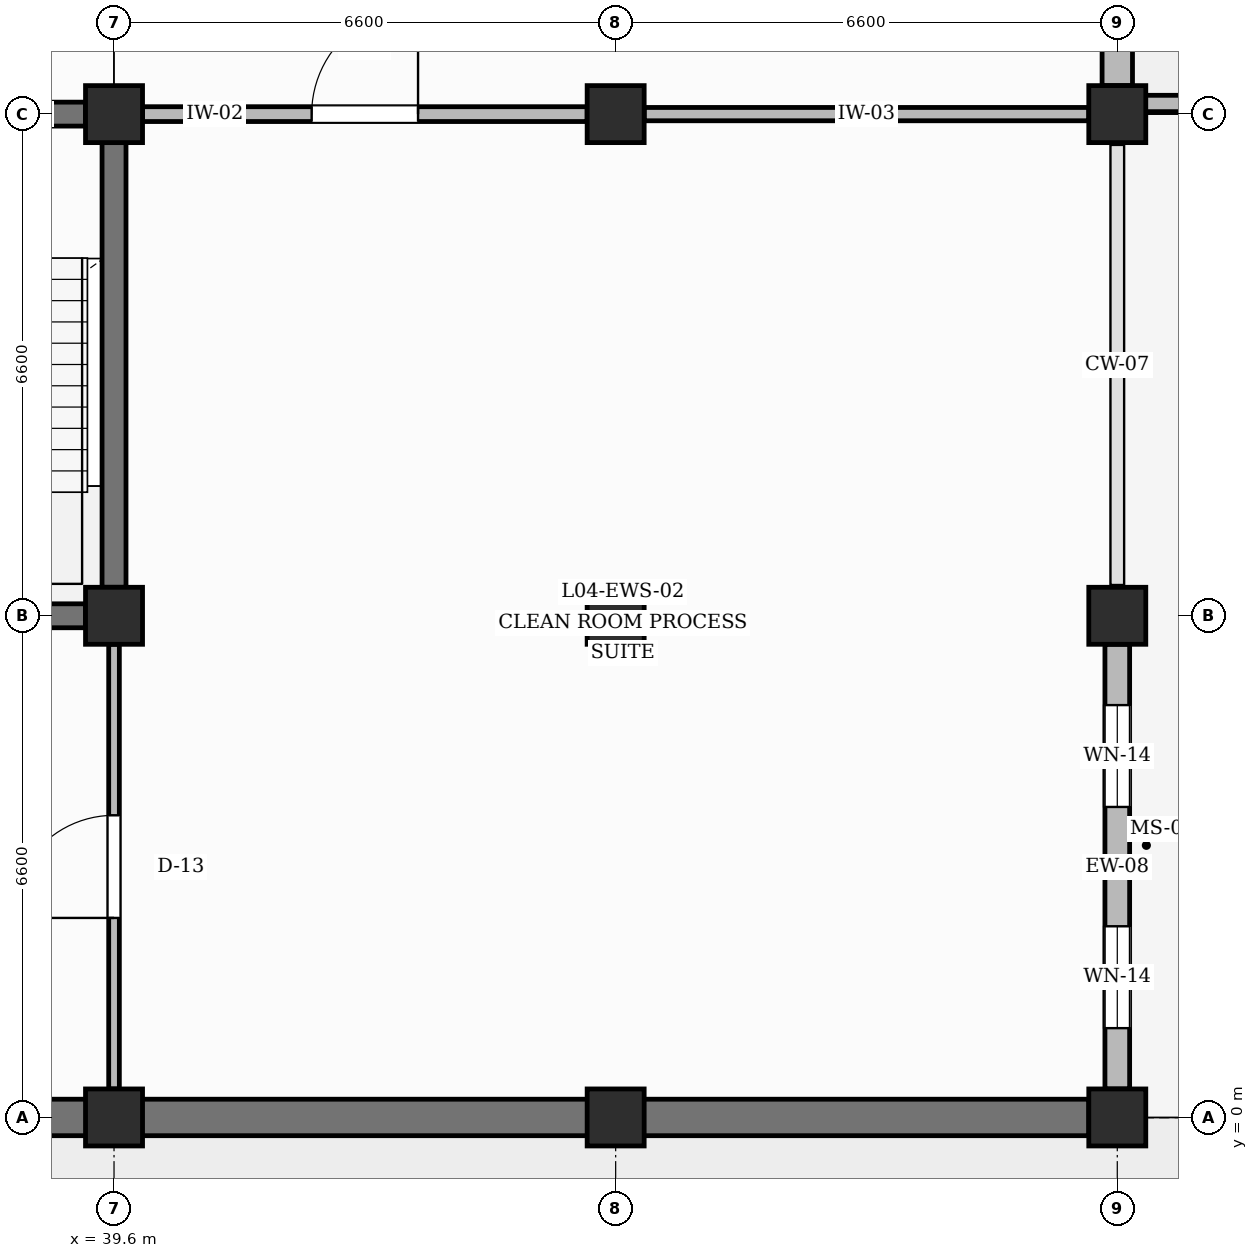
"""IFC4 building model, lengths in metres.
Left out: names, types, materials, properties, quantities, classifications, styles, units other than length and angle.
Written with IfcOpenShell. Run it as: python <this file> out.ifc"""

import sys

from ifc_helpers import new_model, si_unit, direction, frame, frame_2d, origin, origin_2d, place, context, subcontext, project, spatial, rectangle, extrude, element, fill, save


model = new_model("IFC4")
c1 = context("Model", 3, precision=1e-05, world=origin(), true_north=direction((0.0, 1.0)))
c2 = subcontext(c1, "Body", "Model", "MODEL_VIEW")
j1 = project(units=[si_unit("LENGTHUNIT", "METRE"), si_unit("PLANEANGLEUNIT", "RADIAN")], contexts=[c1])
p1 = place(None, origin())
s1 = spatial("IfcSite", under=j1, at=p1, CompositionType="ELEMENT")
p2 = place(p1, origin())
s2 = spatial("IfcBuilding", under=s1, at=p2, CompositionType="ELEMENT")
p3 = place(p2, frame((0.0, 0.0, 18.6)))
s3 = spatial("IfcBuildingStorey", under=s2, at=p3, CompositionType="ELEMENT", Elevation=18.6)
for number, where, z_axis, x_axis in (
    (1, (39.6, 0.0, 0.0), (0.0, 0.0, 1.0), (1.0, 0.0, 0.0)),
    (2, (39.6, 6.6, 0.0), (0.0, 0.0, 1.0), (1.0, 0.0, 0.0)),
    (3, (39.6, 13.2, 0.0), (0.0, 0.0, 1.0), (1.0, 0.0, 0.0)),
    (4, (46.2, 0.0, 0.0), (0.0, 0.0, 1.0), (1.0, 0.0, 0.0)),
    (5, (46.2, 6.6, 0.0), (0.0, 0.0, 1.0), (1.0, 0.0, 0.0)),
    (6, (46.2, 13.2, 0.0), (0.0, 0.0, 1.0), (1.0, 0.0, 0.0)),
    (7, (52.8, 0.0, 0.0), (0.0, 0.0, 1.0), (1.0, 0.0, 0.0)),
    (8, (52.8, 6.6, 0.0), (0.0, 0.0, 1.0), (1.0, 0.0, 0.0)),
    (9, (52.8, 13.2, 0.0), (0.0, 0.0, 1.0), (1.0, 0.0, 0.0)),
):
    element("IfcColumn", number, at=place(p3, frame(where, z_axis=z_axis, x_axis=x_axis)), inside=s3, PredefinedType="COLUMN", context=c2, shape_type="SweptSolid", body=[
        extrude(rectangle(XDim=0.75, YDim=0.75, at=origin_2d()), origin(), (0.0, 0.0, 1.0), 4.2),
    ])
p4 = place(p3, frame((33.4, 0.0, 0.0), z_axis=(0.0, 0.0, 1.0), x_axis=(1.0, 0.0, 0.0)))
e10 = element("IfcWall", 10, at=p4, inside=s3, PredefinedType="SOLIDWALL", context=c2, shape_type="SweptSolid", body=[
    extrude(rectangle(XDim=5.825, YDim=0.48, at=frame_2d((2.913, 0.0))), origin(), (0.0, 0.0, 1.0), 3.26),
])
p5 = place(p3, frame((39.975, 0.0, 0.0), z_axis=(0.0, 0.0, 1.0), x_axis=(1.0, 0.0, 0.0)))
e11 = element("IfcWall", 11, at=p5, inside=s3, PredefinedType="SOLIDWALL", context=c2, shape_type="SweptSolid", body=[
    extrude(rectangle(XDim=5.85, YDim=0.48, at=frame_2d((2.925, 0.0))), origin(), (0.0, 0.0, 1.0), 3.26),
])
p6 = place(p3, frame((46.575, 0.0, 0.0), z_axis=(0.0, 0.0, 1.0), x_axis=(1.0, 0.0, 0.0)))
e12 = element("IfcWall", 12, at=p6, inside=s3, PredefinedType="SOLIDWALL", context=c2, shape_type="SweptSolid", body=[
    extrude(rectangle(XDim=5.85, YDim=0.48, at=frame_2d((2.925, 0.0))), origin(), (0.0, 0.0, 1.0), 3.26),
])
p7 = place(p3, frame((52.8, 0.375, 0.0), z_axis=(0.0, 0.0, 1.0), x_axis=(0.0, 1.0, 0.0)))
e13 = element("IfcWall", 13, at=p7, inside=s3, PredefinedType="SOLIDWALL", context=c2, shape_type="SweptSolid", body=[
    extrude(rectangle(XDim=5.85, YDim=0.325, at=frame_2d((2.925, 0.0))), origin(), (0.0, 0.0, 1.0), 3.26),
])
p8 = place(p7, frame((0.8, 0.0, 0.95)))
e14 = element("IfcOpeningElement", 14, at=p8, cuts=e13, PredefinedType="OPENING", context=c2, shape_type="SweptSolid", body=[
    extrude(rectangle(XDim=1.34, YDim=1.52, at=frame_2d((0.67, 0.76))), frame((0.0, 0.172, 0.0), z_axis=(0.0, -1.0, 0.0), x_axis=(1.0, 0.0, 0.0)), (0.0, 0.0, 1.0), 0.345),
])
p9 = place(p7, frame((3.71, 0.0, 0.95)))
e15 = element("IfcOpeningElement", 15, at=p9, cuts=e13, PredefinedType="OPENING", context=c2, shape_type="SweptSolid", body=[
    extrude(rectangle(XDim=1.34, YDim=1.52, at=frame_2d((0.67, 0.76))), frame((0.0, 0.172, 0.0), z_axis=(0.0, -1.0, 0.0), x_axis=(1.0, 0.0, 0.0)), (0.0, 0.0, 1.0), 0.345),
])
p10 = place(p3, frame((52.8, 13.575, 0.0), z_axis=(0.0, 0.0, 1.0), x_axis=(0.0, 1.0, 0.0)))
e16 = element("IfcWall", 16, at=p10, inside=s3, PredefinedType="SOLIDWALL", context=c2, shape_type="SweptSolid", body=[
    extrude(rectangle(XDim=5.85, YDim=0.4, at=frame_2d((2.925, 0.0))), origin(), (0.0, 0.0, 1.0), 3.26),
])
p11 = place(p10, frame((2.25, 0.0, 0.0)))
e17 = element("IfcOpeningElement", 17, at=p11, cuts=e16, PredefinedType="OPENING", context=c2, shape_type="SweptSolid", body=[
    extrude(rectangle(XDim=1.35, YDim=2.25, at=frame_2d((0.675, 1.125))), frame((0.0, 0.21, 0.0), z_axis=(0.0, -1.0, 0.0), x_axis=(1.0, 0.0, 0.0)), (0.0, 0.0, 1.0), 0.42),
])
p12 = place(p3, frame((52.94, 13.34, 0.0), z_axis=(0.0, 0.0, 1.0), x_axis=(1.0, 0.0, 0.0)))
e18 = element("IfcWall", 18, at=p12, inside=s3, PredefinedType="PARAPET", context=c2, shape_type="SweptSolid", body=[
    extrude(rectangle(XDim=6.32, YDim=0.215, at=frame_2d((3.16, 0.0))), origin(), (0.0, 0.0, 1.0), 1.15),
])
p13 = place(p3, frame((33.4, 6.6, 0.0), z_axis=(0.0, 0.0, 1.0), x_axis=(1.0, 0.0, 0.0)))
e19 = element("IfcWall", 19, at=p13, inside=s3, PredefinedType="SHEAR", context=c2, shape_type="SweptSolid", body=[
    extrude(rectangle(XDim=5.825, YDim=0.315, at=frame_2d((2.913, 0.0))), origin(), (0.0, 0.0, 1.0), 3.16),
])
p14 = place(p3, frame((33.4, 13.2, 0.0), z_axis=(0.0, 0.0, 1.0), x_axis=(1.0, 0.0, 0.0)))
e20 = element("IfcWall", 20, at=p14, inside=s3, PredefinedType="SHEAR", context=c2, shape_type="SweptSolid", body=[
    extrude(rectangle(XDim=5.825, YDim=0.315, at=frame_2d((2.913, 0.0))), origin(), (0.0, 0.0, 1.0), 3.16),
])
p15 = place(p14, frame((2.337, 0.0, 0.0)))
e21 = element("IfcOpeningElement", 21, at=p15, cuts=e20, PredefinedType="OPENING", context=c2, shape_type="SweptSolid", body=[
    extrude(rectangle(XDim=1.15, YDim=2.2, at=frame_2d((0.575, 1.1))), frame((0.0, 0.167, 0.0), z_axis=(0.0, -1.0, 0.0), x_axis=(1.0, 0.0, 0.0)), (0.0, 0.0, 1.0), 0.335),
])
p16 = place(p3, frame((39.6, 6.975, 0.0), z_axis=(0.0, 0.0, 1.0), x_axis=(0.0, 1.0, 0.0)))
e22 = element("IfcWall", 22, at=p16, inside=s3, PredefinedType="SHEAR", context=c2, shape_type="SweptSolid", body=[
    extrude(rectangle(XDim=5.85, YDim=0.315, at=frame_2d((2.925, 0.0))), origin(), (0.0, 0.0, 1.0), 3.16),
])
p17 = place(p3, frame((39.6, 0.375, 0.0), z_axis=(0.0, 0.0, 1.0), x_axis=(0.0, 1.0, 0.0)))
e23 = element("IfcWall", 23, at=p17, inside=s3, PredefinedType="PARTITIONING", context=c2, shape_type="SweptSolid", body=[
    extrude(rectangle(XDim=5.85, YDim=0.14, at=frame_2d((2.925, 0.0))), origin(), (0.0, 0.0, 1.0), 3.16),
])
p18 = place(p17, frame((2.25, 0.0, 0.0)))
e24 = element("IfcOpeningElement", 24, at=p18, cuts=e23, PredefinedType="OPENING", context=c2, shape_type="SweptSolid", body=[
    extrude(rectangle(XDim=1.35, YDim=2.3, at=frame_2d((0.675, 1.15))), frame((0.0, 0.08, 0.0), z_axis=(0.0, -1.0, 0.0), x_axis=(1.0, 0.0, 0.0)), (0.0, 0.0, 1.0), 0.16),
])
p19 = place(p3, frame((39.975, 13.2, 0.0), z_axis=(0.0, 0.0, 1.0), x_axis=(1.0, 0.0, 0.0)))
e25 = element("IfcWall", 25, at=p19, inside=s3, PredefinedType="PARTITIONING", context=c2, shape_type="SweptSolid", body=[
    extrude(rectangle(XDim=5.85, YDim=0.195, at=frame_2d((2.925, 0.0))), origin(), (0.0, 0.0, 1.0), 3.16),
])
p20 = place(p19, frame((2.225, 0.0, 0.0)))
e26 = element("IfcOpeningElement", 26, at=p20, cuts=e25, PredefinedType="OPENING", context=c2, shape_type="SweptSolid", body=[
    extrude(rectangle(XDim=1.4, YDim=2.25, at=frame_2d((0.7, 1.125))), frame((0.0, 0.107, 0.0), z_axis=(0.0, -1.0, 0.0), x_axis=(1.0, 0.0, 0.0)), (0.0, 0.0, 1.0), 0.215),
])
p21 = place(p3, frame((46.575, 13.2, 0.0), z_axis=(0.0, 0.0, 1.0), x_axis=(1.0, 0.0, 0.0)))
e27 = element("IfcWall", 27, at=p21, inside=s3, PredefinedType="PARTITIONING", context=c2, shape_type="SweptSolid", body=[
    extrude(rectangle(XDim=5.85, YDim=0.175, at=frame_2d((2.925, 0.0))), origin(), (0.0, 0.0, 1.0), 3.16),
])
p22 = place(p8, origin())
e28 = element("IfcWindow", 28, at=p22, inside=s3, PartitioningType="SINGLE_PANEL", PredefinedType="WINDOW", context=c2, shape_type="SweptSolid", body=[
    extrude(rectangle(XDim=1.34, YDim=1.52, at=frame_2d((0.67, 0.76))), frame((0.0, 0.03, 0.0), z_axis=(0.0, -1.0, 0.0), x_axis=(1.0, 0.0, 0.0)), (0.0, 0.0, 1.0), 0.06),
])
fill(e14, e28)
p23 = place(p9, origin())
e29 = element("IfcWindow", 29, at=p23, inside=s3, PartitioningType="SINGLE_PANEL", PredefinedType="WINDOW", context=c2, shape_type="SweptSolid", body=[
    extrude(rectangle(XDim=1.34, YDim=1.52, at=frame_2d((0.67, 0.76))), frame((0.0, 0.03, 0.0), z_axis=(0.0, -1.0, 0.0), x_axis=(1.0, 0.0, 0.0)), (0.0, 0.0, 1.0), 0.06),
])
fill(e15, e29)
p24 = place(p20, origin())
e30 = element("IfcDoor", 30, at=p24, inside=s3, OperationType="SINGLE_SWING_RIGHT", PredefinedType="DOOR", context=c2, shape_type="SweptSolid", body=[
    extrude(rectangle(XDim=1.4, YDim=2.25, at=frame_2d((0.7, 1.125))), frame((0.0, 0.025, 0.0), z_axis=(0.0, -1.0, 0.0), x_axis=(1.0, 0.0, 0.0)), (0.0, 0.0, 1.0), 0.05),
])
fill(e26, e30)
p25 = place(p18, origin())
e31 = element("IfcDoor", 31, at=p25, inside=s3, OperationType="SINGLE_SWING_LEFT", PredefinedType="DOOR", context=c2, shape_type="SweptSolid", body=[
    extrude(rectangle(XDim=1.35, YDim=2.3, at=frame_2d((0.675, 1.15))), frame((0.0, 0.025, 0.0), z_axis=(0.0, -1.0, 0.0), x_axis=(1.0, 0.0, 0.0)), (0.0, 0.0, 1.0), 0.05),
])
fill(e24, e31)
save(model, sys.argv[1])
